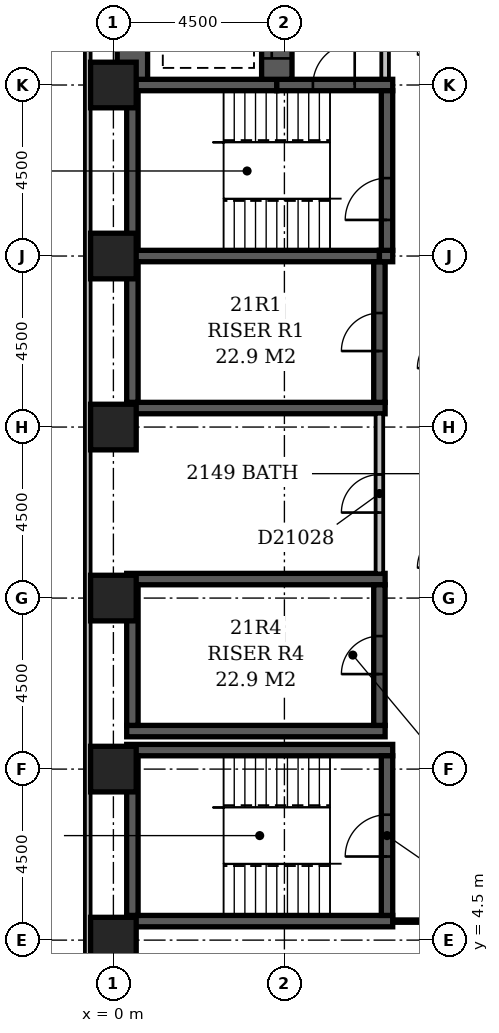
"""IFC4 building model, lengths in metres.
Left out: names, types, materials, properties, quantities, classifications, styles, units other than length and angle.
Written with IfcOpenShell. Run it as: python <this file> out.ifc"""

import sys

from ifc_helpers import new_model, si_unit, direction, frame, frame_2d, origin, origin_2d, place, context, subcontext, project, spatial, rectangle, extrude, element, fill, save


model = new_model("IFC4")
c1 = context("Model", 3, precision=1e-05, world=origin(), true_north=direction((0.0, 1.0)))
c2 = subcontext(c1, "Body", "Model", "MODEL_VIEW")
j1 = project(units=[si_unit("LENGTHUNIT", "METRE"), si_unit("PLANEANGLEUNIT", "RADIAN")], contexts=[c1])
p1 = place(None, origin())
s1 = spatial("IfcSite", under=j1, at=p1, CompositionType="ELEMENT")
p2 = place(p1, origin())
s2 = spatial("IfcBuilding", under=s1, at=p2, CompositionType="ELEMENT")
p3 = place(p2, frame((0.0, 0.0, 86.6)))
s3 = spatial("IfcBuildingStorey", under=s2, at=p3, CompositionType="ELEMENT", Elevation=86.6)
for number, where, z_axis, x_axis in (
    (1, (0.35, 5.0, -0.3), (0.0, 0.0, 1.0), (1.0, 0.0, 0.0)),
    (2, (0.35, 9.5, -0.3), (0.0, 0.0, 1.0), (1.0, 0.0, 0.0)),
):
    element("IfcWall", number, at=place(p3, frame(where, z_axis=z_axis, x_axis=x_axis)), inside=s3, PredefinedType="SHEAR", context=c2, shape_type="SweptSolid", body=[
        extrude(rectangle(XDim=7.0, YDim=0.3, at=frame_2d((3.5, 0.0))), origin(), (0.0, 0.0, 1.0), 3.6),
    ])
for number, where, z_axis, x_axis in (
    (3, (0.35, 10.0, -0.3), (0.0, 0.0, 1.0), (1.0, 0.0, 0.0)),
    (4, (0.35, 14.0, -0.3), (0.0, 0.0, 1.0), (1.0, 0.0, 0.0)),
    (5, (0.35, 18.5, -0.3), (0.0, 0.0, 1.0), (1.0, 0.0, 0.0)),
):
    element("IfcWall", number, at=place(p3, frame(where, z_axis=z_axis, x_axis=x_axis)), inside=s3, PredefinedType="SHEAR", context=c2, shape_type="SweptSolid", body=[
        extrude(rectangle(XDim=6.8, YDim=0.3, at=frame_2d((3.4, 0.0))), origin(), (0.0, 0.0, 1.0), 3.6),
    ])
p4 = place(p3, frame((0.35, 22.5, -0.3), z_axis=(0.0, 0.0, 1.0), x_axis=(1.0, 0.0, 0.0)))
e6 = element("IfcWall", 6, at=p4, inside=s3, PredefinedType="SHEAR", context=c2, shape_type="SweptSolid", body=[
    extrude(rectangle(XDim=6.65, YDim=0.3, at=frame_2d((3.325, 0.0))), origin(), (0.0, 0.0, 1.0), 3.6),
])
p5 = place(p3, frame((0.35, 27.0, -0.3), z_axis=(0.0, 0.0, 1.0), x_axis=(1.0, 0.0, 0.0)))
e7 = element("IfcWall", 7, at=p5, inside=s3, PredefinedType="SHEAR", context=c2, shape_type="SweptSolid", body=[
    extrude(rectangle(XDim=3.95, YDim=0.3, at=frame_2d((1.975, 0.0))), origin(), (0.0, 0.0, 1.0), 3.6),
])
p6 = place(p3, frame((0.5, 5.15, -0.3), z_axis=(0.0, 0.0, 1.0), x_axis=(0.0, 1.0, 0.0)))
e8 = element("IfcWall", 8, at=p6, inside=s3, PredefinedType="SHEAR", context=c2, shape_type="SweptSolid", body=[
    extrude(rectangle(XDim=4.2, YDim=0.3, at=frame_2d((2.1, 0.0))), origin(), (0.0, 0.0, 1.0), 3.6),
])
for number, where, z_axis, x_axis in (
    (9, (0.5, 10.15, -0.3), (0.0, 0.0, 1.0), (0.0, 1.0, 0.0)),
    (10, (0.5, 18.65, -0.3), (0.0, 0.0, 1.0), (0.0, 1.0, 0.0)),
):
    element("IfcWall", number, at=place(p3, frame(where, z_axis=z_axis, x_axis=x_axis)), inside=s3, PredefinedType="SHEAR", context=c2, shape_type="SweptSolid", body=[
        extrude(rectangle(XDim=3.7, YDim=0.3, at=frame_2d((1.85, 0.0))), origin(), (0.0, 0.0, 1.0), 3.6),
    ])
p7 = place(p3, frame((0.5, 22.65, -0.3), z_axis=(0.0, 0.0, 1.0), x_axis=(0.0, 1.0, 0.0)))
e11 = element("IfcWall", 11, at=p7, inside=s3, PredefinedType="SHEAR", context=c2, shape_type="SweptSolid", body=[
    extrude(rectangle(XDim=4.2, YDim=0.3, at=frame_2d((2.1, 0.0))), origin(), (0.0, 0.0, 1.0), 3.6),
])
p8 = place(p3, frame((0.5, 27.15, -0.3), z_axis=(0.0, 0.0, 1.0), x_axis=(0.0, 1.0, 0.0)))
e12 = element("IfcWall", 12, at=p8, inside=s3, PredefinedType="SHEAR", context=c2, shape_type="SweptSolid", body=[
    extrude(rectangle(XDim=6.95, YDim=0.8, at=frame_2d((3.475, 0.0))), origin(), (0.0, 0.0, 1.0), 3.6),
])
p9 = place(p3, frame((4.3, 27.0, -0.3), z_axis=(0.0, 0.0, 1.0), x_axis=(1.0, 0.0, 0.0)))
e13 = element("IfcWall", 13, at=p9, inside=s3, PredefinedType="SHEAR", context=c2, shape_type="SweptSolid", body=[
    extrude(rectangle(XDim=3.05, YDim=0.3, at=frame_2d((1.525, 0.0))), origin(), (0.0, 0.0, 1.0), 3.6),
])
p10 = place(p9, frame((0.95, 0.0, 0.3)))
e14 = element("IfcOpeningElement", 14, at=p10, cuts=e13, PredefinedType="OPENING", context=c2, shape_type="SweptSolid", body=[
    extrude(rectangle(XDim=1.1, YDim=2.1, at=frame_2d((0.55, 1.05))), frame((0.0, 0.162, 0.0), z_axis=(0.0, -1.0, 0.0), x_axis=(1.0, 0.0, 0.0)), (0.0, 0.0, 1.0), 0.324),
])
p11 = place(p3, frame((4.3, 27.15, -0.3), z_axis=(0.0, 0.0, 1.0), x_axis=(0.0, 1.0, 0.0)))
e15 = element("IfcWall", 15, at=p11, inside=s3, PredefinedType="SHEAR", context=c2, shape_type="SweptSolid", body=[
    extrude(rectangle(XDim=6.95, YDim=0.8, at=frame_2d((3.475, 0.0))), origin(), (0.0, 0.0, 1.0), 3.6),
])
p12 = place(p11, frame((3.05, 0.0, 0.3)))
e16 = element("IfcOpeningElement", 16, at=p12, cuts=e15, PredefinedType="OPENING", context=c2, shape_type="SweptSolid", body=[
    extrude(rectangle(XDim=1.1, YDim=2.1, at=frame_2d((0.55, 1.05))), frame((0.0, 0.412, 0.0), z_axis=(0.0, -1.0, 0.0), x_axis=(1.0, 0.0, 0.0)), (0.0, 0.0, 1.0), 0.824),
])
p13 = place(p11, frame((0.55, 0.0, 0.3)))
e17 = element("IfcOpeningElement", 17, at=p13, cuts=e15, PredefinedType="OPENING", context=c2, shape_type="SweptSolid", body=[
    extrude(rectangle(XDim=1.1, YDim=2.1, at=frame_2d((0.55, 1.05))), frame((0.0, 0.412, 0.0), z_axis=(0.0, -1.0, 0.0), x_axis=(1.0, 0.0, 0.0)), (0.0, 0.0, 1.0), 0.824),
])
p14 = place(p11, frame((5.35, 0.0, 0.3)))
e18 = element("IfcOpeningElement", 18, at=p14, cuts=e15, PredefinedType="OPENING", context=c2, shape_type="SweptSolid", body=[
    extrude(rectangle(XDim=1.1, YDim=2.1, at=frame_2d((0.55, 1.05))), frame((0.0, 0.412, 0.0), z_axis=(0.0, -1.0, 0.0), x_axis=(1.0, 0.0, 0.0)), (0.0, 0.0, 1.0), 0.824),
])
p15 = place(p3, frame((7.0, 10.15, -0.3), z_axis=(0.0, 0.0, 1.0), x_axis=(0.0, 1.0, 0.0)))
e19 = element("IfcWall", 19, at=p15, inside=s3, PredefinedType="SHEAR", context=c2, shape_type="SweptSolid", body=[
    extrude(rectangle(XDim=3.7, YDim=0.3, at=frame_2d((1.85, 0.0))), origin(), (0.0, 0.0, 1.0), 3.6),
])
p16 = place(p15, frame((1.35, 0.0, 0.3)))
e20 = element("IfcOpeningElement", 20, at=p16, cuts=e19, PredefinedType="OPENING", context=c2, shape_type="SweptSolid", body=[
    extrude(rectangle(XDim=1.0, YDim=2.1, at=frame_2d((0.5, 1.05))), frame((0.0, 0.162, 0.0), z_axis=(0.0, -1.0, 0.0), x_axis=(1.0, 0.0, 0.0)), (0.0, 0.0, 1.0), 0.324),
])
p17 = place(p3, frame((7.0, 18.65, -0.3), z_axis=(0.0, 0.0, 1.0), x_axis=(0.0, 1.0, 0.0)))
e21 = element("IfcWall", 21, at=p17, inside=s3, PredefinedType="SHEAR", context=c2, shape_type="SweptSolid", body=[
    extrude(rectangle(XDim=3.7, YDim=0.3, at=frame_2d((1.85, 0.0))), origin(), (0.0, 0.0, 1.0), 3.6),
])
p18 = place(p17, frame((1.35, 0.0, 0.3)))
e22 = element("IfcOpeningElement", 22, at=p18, cuts=e21, PredefinedType="OPENING", context=c2, shape_type="SweptSolid", body=[
    extrude(rectangle(XDim=1.0, YDim=2.1, at=frame_2d((0.5, 1.05))), frame((0.0, 0.162, 0.0), z_axis=(0.0, -1.0, 0.0), x_axis=(1.0, 0.0, 0.0)), (0.0, 0.0, 1.0), 0.324),
])
p19 = place(p3, frame((7.0, 22.5, -0.3), z_axis=(0.0, 0.0, 1.0), x_axis=(1.0, 0.0, 0.0)))
e23 = element("IfcWall", 23, at=p19, inside=s3, PredefinedType="SHEAR", context=c2, shape_type="SweptSolid", body=[
    extrude(rectangle(XDim=0.35, YDim=0.3, at=frame_2d((0.175, 0.0))), origin(), (0.0, 0.0, 1.0), 3.6),
])
p20 = place(p3, frame((7.2, 5.15, -0.3), z_axis=(0.0, 0.0, 1.0), x_axis=(0.0, 1.0, 0.0)))
e24 = element("IfcWall", 24, at=p20, inside=s3, PredefinedType="SHEAR", context=c2, shape_type="SweptSolid", body=[
    extrude(rectangle(XDim=4.2, YDim=0.3, at=frame_2d((2.1, 0.0))), origin(), (0.0, 0.0, 1.0), 3.6),
])
p21 = place(p20, frame((1.55, 0.0, 0.3)))
e25 = element("IfcOpeningElement", 25, at=p21, cuts=e24, PredefinedType="OPENING", context=c2, shape_type="SweptSolid", body=[
    extrude(rectangle(XDim=1.1, YDim=2.1, at=frame_2d((0.55, 1.05))), frame((0.0, 0.162, 0.0), z_axis=(0.0, -1.0, 0.0), x_axis=(1.0, 0.0, 0.0)), (0.0, 0.0, 1.0), 0.324),
])
p22 = place(p3, frame((7.2, 22.65, -0.3), z_axis=(0.0, 0.0, 1.0), x_axis=(0.0, 1.0, 0.0)))
e26 = element("IfcWall", 26, at=p22, inside=s3, PredefinedType="SHEAR", context=c2, shape_type="SweptSolid", body=[
    extrude(rectangle(XDim=4.2, YDim=0.3, at=frame_2d((2.1, 0.0))), origin(), (0.0, 0.0, 1.0), 3.6),
])
p23 = place(p22, frame((0.8, 0.0, 0.3)))
e27 = element("IfcOpeningElement", 27, at=p23, cuts=e26, PredefinedType="OPENING", context=c2, shape_type="SweptSolid", body=[
    extrude(rectangle(XDim=1.1, YDim=2.1, at=frame_2d((0.55, 1.05))), frame((0.0, 0.162, 0.0), z_axis=(0.0, -1.0, 0.0), x_axis=(1.0, 0.0, 0.0)), (0.0, 0.0, 1.0), 0.324),
])
for number, where, z_axis, x_axis in (
    (28, (0.0, 4.5, -0.3), (0.0, 0.0, 1.0), (1.0, 0.0, 0.0)),
    (29, (0.0, 9.0, -0.3), (0.0, 0.0, 1.0), (1.0, 0.0, 0.0)),
    (30, (0.0, 13.5, -0.3), (0.0, 0.0, 1.0), (1.0, 0.0, 0.0)),
    (31, (0.0, 18.0, -0.3), (0.0, 0.0, 1.0), (1.0, 0.0, 0.0)),
    (32, (0.0, 22.5, -0.3), (0.0, 0.0, 1.0), (1.0, 0.0, 0.0)),
    (33, (0.0, 27.0, -0.3), (0.0, 0.0, 1.0), (1.0, 0.0, 0.0)),
):
    element("IfcColumn", number, at=place(p3, frame(where, z_axis=z_axis, x_axis=x_axis)), inside=s3, PredefinedType="COLUMN", context=c2, shape_type="SweptSolid", body=[
        extrude(rectangle(XDim=1.2, YDim=1.2, at=origin_2d()), origin(), (0.0, 0.0, 1.0), 3.6),
    ])
p24 = place(p3, frame((-0.675, 59.1, 0.0), z_axis=(0.0, 0.0, 1.0), x_axis=(0.0, -1.0, 0.0)))
e34 = element("IfcWall", 34, at=p24, inside=s3, PredefinedType="STANDARD", context=c2, shape_type="SweptSolid", body=[
    extrude(rectangle(XDim=55.35, YDim=0.15, at=frame_2d((27.675, 0.0))), origin(), (0.0, 0.0, 1.0), 2.7),
])
p25 = place(p24, frame((10.65, 0.0, 0.6)))
e35 = element("IfcOpeningElement", 35, at=p25, cuts=e34, PredefinedType="OPENING", context=c2, shape_type="SweptSolid", body=[
    extrude(rectangle(XDim=2.4, YDim=1.8, at=frame_2d((1.2, 0.9))), frame((0.0, 0.087, 0.0), z_axis=(0.0, -1.0, 0.0), x_axis=(1.0, 0.0, 0.0)), (0.0, 0.0, 1.0), 0.174),
])
p26 = place(p24, frame((15.15, 0.0, 0.6)))
e36 = element("IfcOpeningElement", 36, at=p26, cuts=e34, PredefinedType="OPENING", context=c2, shape_type="SweptSolid", body=[
    extrude(rectangle(XDim=2.4, YDim=1.8, at=frame_2d((1.2, 0.9))), frame((0.0, 0.087, 0.0), z_axis=(0.0, -1.0, 0.0), x_axis=(1.0, 0.0, 0.0)), (0.0, 0.0, 1.0), 0.174),
])
p27 = place(p24, frame((19.65, 0.0, 0.6)))
e37 = element("IfcOpeningElement", 37, at=p27, cuts=e34, PredefinedType="OPENING", context=c2, shape_type="SweptSolid", body=[
    extrude(rectangle(XDim=2.4, YDim=1.8, at=frame_2d((1.2, 0.9))), frame((0.0, 0.087, 0.0), z_axis=(0.0, -1.0, 0.0), x_axis=(1.0, 0.0, 0.0)), (0.0, 0.0, 1.0), 0.174),
])
p28 = place(p3, frame((7.15, 27.17, 0.0), z_axis=(0.0, 0.0, 1.0), x_axis=(0.0, 1.0, 0.0)))
e38 = element("IfcWall", 38, at=p28, inside=s3, PredefinedType="PARTITIONING", context=c2, shape_type="SweptSolid", body=[
    extrude(rectangle(XDim=4.83, YDim=0.2, at=frame_2d((2.415, 0.0))), origin(), (0.0, 0.0, 1.0), 3.3),
])
p29 = place(p28, frame((1.73, 0.0, 0.0)))
e39 = element("IfcOpeningElement", 39, at=p29, cuts=e38, PredefinedType="OPENING", context=c2, shape_type="SweptSolid", body=[
    extrude(rectangle(XDim=1.2, YDim=2.1, at=frame_2d((0.6, 1.05))), frame((0.0, 0.112, 0.0), z_axis=(0.0, -1.0, 0.0), x_axis=(1.0, 0.0, 0.0)), (0.0, 0.0, 1.0), 0.224),
])
p30 = place(p3, frame((0.0, 4.4, 0.0), z_axis=(0.0, 0.0, 1.0), x_axis=(0.0, 1.0, 0.0)))
e40 = element("IfcWall", 40, at=p30, inside=s3, PredefinedType="PARTITIONING", context=c2, shape_type="SweptSolid", body=[
    extrude(rectangle(XDim=0.7, YDim=0.1, at=frame_2d((0.35, 0.0))), origin(), (0.0, 0.0, 1.0), 2.7),
])
p31 = place(p3, frame((7.349, 5.0, 0.0), z_axis=(0.0, 0.0, 1.0), x_axis=(1.0, 0.0, 0.0)))
e41 = element("IfcWall", 41, at=p31, inside=s3, PredefinedType="PARTITIONING", context=c2, shape_type="SweptSolid", body=[
    extrude(rectangle(XDim=1.551, YDim=0.1, at=frame_2d((0.775, 0.0))), origin(), (0.0, 0.0, 1.0), 3.3),
])
p32 = place(p3, frame((7.0, 14.15, 0.0), z_axis=(0.0, 0.0, 1.0), x_axis=(0.0, 1.0, 0.0)))
e42 = element("IfcWall", 42, at=p32, inside=s3, PredefinedType="PARTITIONING", context=c2, shape_type="SweptSolid", body=[
    extrude(rectangle(XDim=4.2, YDim=0.2, at=frame_2d((2.1, 0.0))), origin(), (0.0, 0.0, 1.0), 3.3),
])
p33 = place(p32, frame((1.6, 0.0, 0.0)))
e43 = element("IfcOpeningElement", 43, at=p33, cuts=e42, PredefinedType="OPENING", context=c2, shape_type="SweptSolid", body=[
    extrude(rectangle(XDim=1.0, YDim=2.1, at=frame_2d((0.5, 1.05))), frame((0.0, 0.112, 0.0), z_axis=(0.0, -1.0, 0.0), x_axis=(1.0, 0.0, 0.0)), (0.0, 0.0, 1.0), 0.224),
])
p34 = place(p13, origin())
e44 = element("IfcDoor", 44, at=p34, inside=s3, OperationType="SLIDING_TO_LEFT", PredefinedType="DOOR", context=c2, shape_type="SweptSolid", body=[
    extrude(rectangle(XDim=1.1, YDim=2.1, at=frame_2d((0.55, 1.05))), frame((0.0, 0.025, 0.0), z_axis=(0.0, -1.0, 0.0), x_axis=(1.0, 0.0, 0.0)), (0.0, 0.0, 1.0), 0.05),
])
fill(e17, e44)
p35 = place(p18, origin())
e45 = element("IfcDoor", 45, at=p35, inside=s3, OperationType="SINGLE_SWING_LEFT", PredefinedType="DOOR", context=c2, shape_type="SweptSolid", body=[
    extrude(rectangle(XDim=1.0, YDim=2.1, at=frame_2d((0.5, 1.05))), frame((0.0, 0.025, 0.0), z_axis=(0.0, -1.0, 0.0), x_axis=(1.0, 0.0, 0.0)), (0.0, 0.0, 1.0), 0.05),
])
fill(e22, e45)
p36 = place(p16, origin())
e46 = element("IfcDoor", 46, at=p36, inside=s3, OperationType="SINGLE_SWING_LEFT", PredefinedType="DOOR", context=c2, shape_type="SweptSolid", body=[
    extrude(rectangle(XDim=1.0, YDim=2.1, at=frame_2d((0.5, 1.05))), frame((0.0, 0.025, 0.0), z_axis=(0.0, -1.0, 0.0), x_axis=(1.0, 0.0, 0.0)), (0.0, 0.0, 1.0), 0.05),
])
fill(e20, e46)
p37 = place(p10, frame((1.1, 0.0, 0.0), z_axis=(0.0, 0.0, 1.0), x_axis=(-1.0, 0.0, 0.0)))
e47 = element("IfcDoor", 47, at=p37, inside=s3, OperationType="SINGLE_SWING_LEFT", PredefinedType="DOOR", context=c2, shape_type="SweptSolid", body=[
    extrude(rectangle(XDim=1.1, YDim=2.1, at=frame_2d((0.55, 1.05))), frame((0.0, 0.025, 0.0), z_axis=(0.0, -1.0, 0.0), x_axis=(1.0, 0.0, 0.0)), (0.0, 0.0, 1.0), 0.05),
])
fill(e14, e47)
p38 = place(p23, origin())
e48 = element("IfcDoor", 48, at=p38, inside=s3, OperationType="SINGLE_SWING_LEFT", PredefinedType="DOOR", context=c2, shape_type="SweptSolid", body=[
    extrude(rectangle(XDim=1.1, YDim=2.1, at=frame_2d((0.55, 1.05))), frame((0.0, 0.025, 0.0), z_axis=(0.0, -1.0, 0.0), x_axis=(1.0, 0.0, 0.0)), (0.0, 0.0, 1.0), 0.05),
])
fill(e27, e48)
p39 = place(p21, origin())
e49 = element("IfcDoor", 49, at=p39, inside=s3, OperationType="SINGLE_SWING_LEFT", PredefinedType="DOOR", context=c2, shape_type="SweptSolid", body=[
    extrude(rectangle(XDim=1.1, YDim=2.1, at=frame_2d((0.55, 1.05))), frame((0.0, 0.025, 0.0), z_axis=(0.0, -1.0, 0.0), x_axis=(1.0, 0.0, 0.0)), (0.0, 0.0, 1.0), 0.05),
])
fill(e25, e49)
p40 = place(p33, origin())
e50 = element("IfcDoor", 50, at=p40, inside=s3, OperationType="SINGLE_SWING_LEFT", PredefinedType="DOOR", context=c2, shape_type="SweptSolid", body=[
    extrude(rectangle(XDim=1.0, YDim=2.1, at=frame_2d((0.5, 1.05))), frame((0.0, 0.025, 0.0), z_axis=(0.0, -1.0, 0.0), x_axis=(1.0, 0.0, 0.0)), (0.0, 0.0, 1.0), 0.05),
])
fill(e43, e50)
save(model, sys.argv[1])
